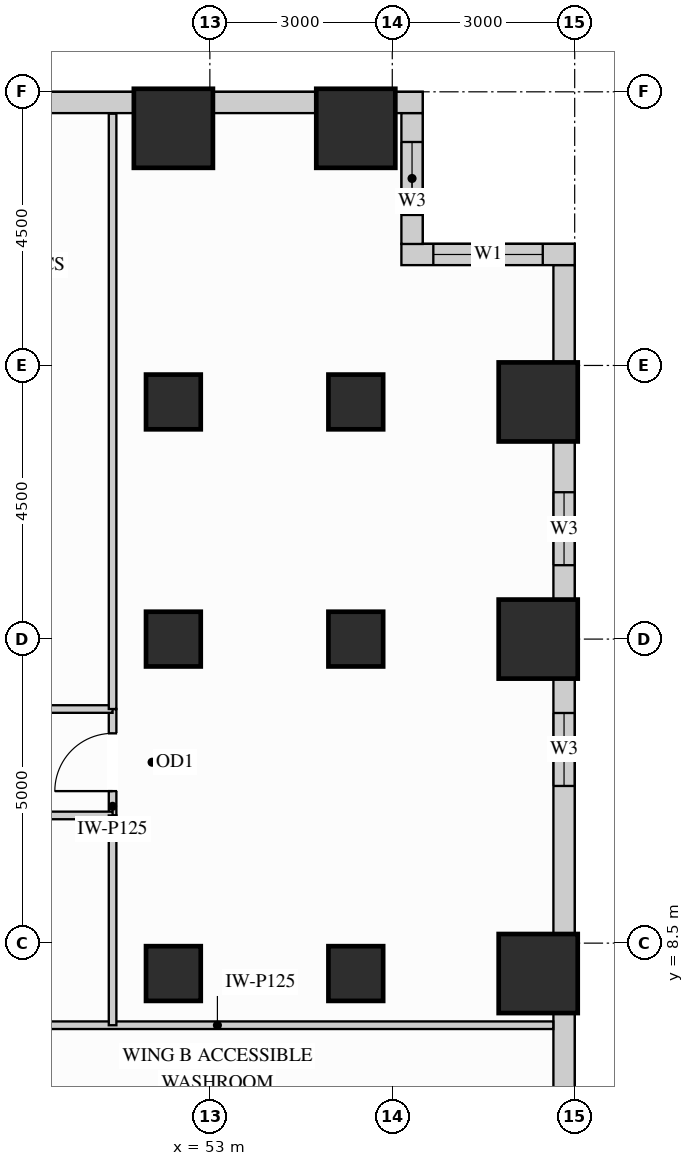
"""IFC4 building model, lengths in metres.
Left out: names, types, materials, properties, quantities, classifications, styles, units other than length and angle.
Written with IfcOpenShell. Run it as: python <this file> out.ifc"""

import sys

from ifc_helpers import new_model, si_unit, direction, frame, frame_2d, origin, origin_2d, place, context, subcontext, project, spatial, rectangle, extrude, source, transform, mapped, element, fill, save


model = new_model("IFC4")
c1 = context("Model", 3, precision=1e-05, world=origin(), true_north=direction((0.0, 1.0)))
c2 = subcontext(c1, "Body", "Model", "MODEL_VIEW")
j1 = project(units=[si_unit("LENGTHUNIT", "METRE"), si_unit("PLANEANGLEUNIT", "RADIAN")], contexts=[c1])
p1 = place(None, origin())
s1 = spatial("IfcSite", under=j1, at=p1, CompositionType="ELEMENT")
p2 = place(p1, origin())
s2 = spatial("IfcBuilding", under=s1, at=p2, CompositionType="ELEMENT")
p3 = place(p2, frame((0.0, 0.0, 62.1)))
s3 = spatial("IfcBuildingStorey", under=s2, at=p3, CompositionType="ELEMENT", Elevation=62.1)
m1 = source(origin(), c2, "Body", "SweptSolid", [
    extrude(rectangle(XDim=0.9, YDim=0.9, at=origin_2d()), origin(), (0.0, 0.0, 1.0), 3.38),
])
for number, where, z_axis, x_axis in (
    (1, (52.4, 13.5, 0.0), (0.0, 0.0, 1.0), (1.0, 0.0, 0.0)),
    (2, (52.4, 17.4, 0.0), (0.0, 0.0, 1.0), (1.0, 0.0, 0.0)),
    (3, (52.4, 8.0, 0.0), (0.0, 0.0, 1.0), (1.0, 0.0, 0.0)),
    (4, (55.4, 13.5, 0.0), (0.0, 0.0, 1.0), (1.0, 0.0, 0.0)),
    (5, (55.4, 17.4, 0.0), (0.0, 0.0, 1.0), (1.0, 0.0, 0.0)),
    (6, (55.4, 8.0, 0.0), (0.0, 0.0, 1.0), (1.0, 0.0, 0.0)),
):
    element("IfcColumn", number, at=place(p3, frame(where, z_axis=z_axis, x_axis=x_axis)), inside=s3, PredefinedType="COLUMN", context=c2, shape_type="MappedRepresentation", body=[
        mapped(m1, transform((0.0, 0.0, 0.0), x_axis=(1.0, 0.0, 0.0), y_axis=(0.0, 1.0, 0.0), z_axis=(0.0, 0.0, 1.0))),
    ])
m2 = source(origin(), c2, "Body", "SweptSolid", [
    extrude(rectangle(XDim=1.3, YDim=1.3, at=origin_2d()), origin(), (0.0, 0.0, 1.0), 3.38),
])
for number, where, z_axis, x_axis in (
    (7, (52.4, 21.9, 0.0), (0.0, 0.0, 1.0), (1.0, 0.0, 0.0)),
    (8, (55.4, 21.9, 0.0), (0.0, 0.0, 1.0), (1.0, 0.0, 0.0)),
    (9, (58.4, 13.5, 0.0), (0.0, 0.0, 1.0), (1.0, 0.0, 0.0)),
    (10, (58.4, 17.4, 0.0), (0.0, 0.0, 1.0), (1.0, 0.0, 0.0)),
    (11, (58.4, 8.0, 0.0), (0.0, 0.0, 1.0), (1.0, 0.0, 0.0)),
):
    element("IfcColumn", number, at=place(p3, frame(where, z_axis=z_axis, x_axis=x_axis)), inside=s3, PredefinedType="COLUMN", context=c2, shape_type="MappedRepresentation", body=[
        mapped(m2, transform((0.0, 0.0, 0.0), x_axis=(1.0, 0.0, 0.0), y_axis=(0.0, 1.0, 0.0), z_axis=(0.0, 0.0, 1.0))),
    ])
m3 = source(origin(), c2, "Body", "SweptSolid", [
    extrude(rectangle(XDim=3.204, YDim=0.35, at=frame_2d((1.602, 0.0))), origin(), (0.0, 0.0, 1.0), 2.51),
])
p4 = place(p3, frame((58.825, 4.148, 0.0), z_axis=(0.0, 0.0, 1.0), x_axis=(0.0, 1.0, 0.0)))
e12 = element("IfcWall", 12, at=p4, inside=s3, PredefinedType="SOLIDWALL", context=c2, shape_type="MappedRepresentation", body=[
    mapped(m3, transform((0.0, 0.0, 0.0), x_axis=(1.0, 0.0, 0.0), y_axis=(0.0, 1.0, 0.0), z_axis=(0.0, 0.0, 1.0))),
])
p5 = place(p3, frame((58.825, 8.648, 0.0), z_axis=(0.0, 0.0, 1.0), x_axis=(0.0, 1.0, 0.0)))
e13 = element("IfcWall", 13, at=p5, inside=s3, PredefinedType="SOLIDWALL", context=c2, shape_type="SweptSolid", body=[
    extrude(rectangle(XDim=4.204, YDim=0.35, at=frame_2d((2.102, 0.0))), origin(), (0.0, 0.0, 1.0), 2.51),
])
p6 = place(p5, frame((2.437, 0.0, 0.78)))
e14 = element("IfcOpeningElement", 14, at=p6, cuts=e13, PredefinedType="OPENING", context=c2, shape_type="SweptSolid", body=[
    extrude(rectangle(XDim=1.2, YDim=1.55, at=frame_2d((0.6, 0.775))), frame((0.0, 0.185, 0.0), z_axis=(0.0, -1.0, 0.0), x_axis=(1.0, 0.0, 0.0)), (0.0, 0.0, 1.0), 0.37),
])
p7 = place(p3, frame((58.825, 14.148, 0.0), z_axis=(0.0, 0.0, 1.0), x_axis=(0.0, 1.0, 0.0)))
e15 = element("IfcWall", 15, at=p7, inside=s3, PredefinedType="SOLIDWALL", context=c2, shape_type="SweptSolid", body=[
    extrude(rectangle(XDim=2.604, YDim=0.35, at=frame_2d((1.302, 0.0))), origin(), (0.0, 0.0, 1.0), 2.51),
])
p8 = place(p7, frame((0.567, 0.0, 0.78)))
e16 = element("IfcOpeningElement", 16, at=p8, cuts=e15, PredefinedType="OPENING", context=c2, shape_type="SweptSolid", body=[
    extrude(rectangle(XDim=1.2, YDim=1.55, at=frame_2d((0.6, 0.775))), frame((0.0, 0.185, 0.0), z_axis=(0.0, -1.0, 0.0), x_axis=(1.0, 0.0, 0.0)), (0.0, 0.0, 1.0), 0.37),
])
m4 = source(origin(), c2, "Body", "SweptSolid", [
    extrude(rectangle(XDim=1.604, YDim=0.35, at=frame_2d((0.802, 0.0))), origin(), (0.0, 0.0, 1.0), 3.365),
])
p9 = place(p3, frame((58.825, 18.048, 0.0), z_axis=(0.0, 0.0, 1.0), x_axis=(0.0, 1.0, 0.0)))
e17 = element("IfcWall", 17, at=p9, inside=s3, PredefinedType="SOLIDWALL", context=c2, shape_type="MappedRepresentation", body=[
    mapped(m4, transform((0.0, 0.0, 0.0), x_axis=(1.0, 0.0, 0.0), y_axis=(0.0, 1.0, 0.0), z_axis=(0.0, 0.0, 1.0))),
])
p10 = place(p3, frame((59.0, 19.825, 0.0), z_axis=(0.0, 0.0, 1.0), x_axis=(-1.0, 0.0, 0.0)))
e18 = element("IfcWall", 18, at=p10, inside=s3, PredefinedType="SOLIDWALL", context=c2, shape_type="SweptSolid", body=[
    extrude(rectangle(XDim=2.85, YDim=0.35, at=frame_2d((1.425, 0.0))), origin(), (0.0, 0.0, 1.0), 3.365),
])
p11 = place(p10, frame((0.525, 0.0, 0.78)))
e19 = element("IfcOpeningElement", 19, at=p11, cuts=e18, PredefinedType="OPENING", context=c2, shape_type="SweptSolid", body=[
    extrude(rectangle(XDim=1.8, YDim=2.1, at=frame_2d((0.9, 1.05))), frame((0.0, 0.185, 0.0), z_axis=(0.0, -1.0, 0.0), x_axis=(1.0, 0.0, 0.0)), (0.0, 0.0, 1.0), 0.37),
])
p12 = place(p3, frame((56.325, 19.998, 0.0), z_axis=(0.0, 0.0, 1.0), x_axis=(0.0, 1.0, 0.0)))
e20 = element("IfcWall", 20, at=p12, inside=s3, PredefinedType="SOLIDWALL", context=c2, shape_type="SweptSolid", body=[
    extrude(rectangle(XDim=2.154, YDim=0.35, at=frame_2d((1.077, 0.0))), origin(), (0.0, 0.0, 1.0), 3.365),
])
p13 = place(p12, frame((0.477, 0.0, 0.78)))
e21 = element("IfcOpeningElement", 21, at=p13, cuts=e20, PredefinedType="OPENING", context=c2, shape_type="SweptSolid", body=[
    extrude(rectangle(XDim=1.2, YDim=2.1, at=frame_2d((0.6, 1.05))), frame((0.0, 0.185, 0.0), z_axis=(0.0, -1.0, 0.0), x_axis=(1.0, 0.0, 0.0)), (0.0, 0.0, 1.0), 0.37),
])
m5 = source(origin(), c2, "Body", "SweptSolid", [
    extrude(rectangle(XDim=0.452, YDim=0.35, at=frame_2d((0.226, 0.0))), origin(), (0.0, 0.0, 1.0), 3.365),
])
p14 = place(p3, frame((56.5, 22.325, 0.0), z_axis=(0.0, 0.0, 1.0), x_axis=(-1.0, 0.0, 0.0)))
e22 = element("IfcWall", 22, at=p14, inside=s3, PredefinedType="SOLIDWALL", context=c2, shape_type="MappedRepresentation", body=[
    mapped(m5, transform((0.0, 0.0, 0.0), x_axis=(1.0, 0.0, 0.0), y_axis=(0.0, 1.0, 0.0), z_axis=(0.0, 0.0, 1.0))),
])
m6 = source(origin(), c2, "Body", "SweptSolid", [
    extrude(rectangle(XDim=1.704, YDim=0.35, at=frame_2d((0.852, 0.0))), origin(), (0.0, 0.0, 1.0), 2.51),
])
for number, where, z_axis, x_axis in (
    (23, (54.752, 22.325, 0.0), (0.0, 0.0, 1.0), (-1.0, 0.0, 0.0)),
    (24, (51.752, 22.325, 0.0), (0.0, 0.0, 1.0), (-1.0, 0.0, 0.0)),
):
    element("IfcWall", number, at=place(p3, frame(where, z_axis=z_axis, x_axis=x_axis)), inside=s3, PredefinedType="SOLIDWALL", context=c2, shape_type="MappedRepresentation", body=[
        mapped(m6, transform((0.0, 0.0, 0.0), x_axis=(1.0, 0.0, 0.0), y_axis=(0.0, 1.0, 0.0), z_axis=(0.0, 0.0, 1.0))),
    ])
p15 = place(p3, frame((51.4, 10.6, 0.0), z_axis=(0.0, 0.0, 1.0), x_axis=(0.0, 1.0, 0.0)))
e25 = element("IfcWall", 25, at=p15, inside=s3, PredefinedType="PARTITIONING", context=c2, shape_type="SweptSolid", body=[
    extrude(rectangle(XDim=1.75, YDim=0.125, at=frame_2d((0.875, 0.0))), origin(), (0.0, 0.0, 1.0), 3.365),
])
p16 = place(p15, frame((0.4, 0.0, 0.0)))
e26 = element("IfcOpeningElement", 26, at=p16, cuts=e25, PredefinedType="OPENING", context=c2, shape_type="SweptSolid", body=[
    extrude(rectangle(XDim=0.95, YDim=2.15, at=frame_2d((0.475, 1.075))), frame((0.0, 0.073, 0.0), z_axis=(0.0, -1.0, 0.0), x_axis=(1.0, 0.0, 0.0)), (0.0, 0.0, 1.0), 0.145),
])
m7 = source(origin(), c2, "Body", "SweptSolid", [
    extrude(rectangle(XDim=11.048, YDim=0.125, at=frame_2d((5.524, 0.0))), origin(), (0.0, 0.0, 1.0), 3.365),
])
p17 = place(p3, frame((47.6, 7.15, 0.0), z_axis=(0.0, 0.0, 1.0), x_axis=(1.0, 0.0, 0.0)))
e27 = element("IfcWall", 27, at=p17, inside=s3, PredefinedType="PARTITIONING", context=c2, shape_type="MappedRepresentation", body=[
    mapped(m7, transform((0.0, 0.0, 0.0), x_axis=(1.0, 0.0, 0.0), y_axis=(0.0, 1.0, 0.0), z_axis=(0.0, 0.0, 1.0))),
])
m8 = source(origin(), c2, "Body", "SweptSolid", [
    extrude(rectangle(XDim=3.8, YDim=0.125, at=frame_2d((1.9, 0.0))), origin(), (0.0, 0.0, 1.0), 3.365),
])
p18 = place(p3, frame((47.6, 12.35, 0.0), z_axis=(0.0, 0.0, 1.0), x_axis=(1.0, 0.0, 0.0)))
e28 = element("IfcWall", 28, at=p18, inside=s3, PredefinedType="PARTITIONING", context=c2, shape_type="MappedRepresentation", body=[
    mapped(m8, transform((0.0, 0.0, 0.0), x_axis=(1.0, 0.0, 0.0), y_axis=(0.0, 1.0, 0.0), z_axis=(0.0, 0.0, 1.0))),
])
p19 = place(p3, frame((47.6, 10.6, 0.0), z_axis=(0.0, 0.0, 1.0), x_axis=(1.0, 0.0, 0.0)))
e29 = element("IfcWall", 29, at=p19, inside=s3, PredefinedType="PARTITIONING", context=c2, shape_type="SweptSolid", body=[
    extrude(rectangle(XDim=3.8, YDim=0.125, at=frame_2d((1.9, 0.0))), origin(), (0.0, 0.0, 1.0), 2.67),
])
p20 = place(p19, frame((1.425, 0.0, 0.0)))
e30 = element("IfcOpeningElement", 30, at=p20, cuts=e29, PredefinedType="OPENING", context=c2, shape_type="SweptSolid", body=[
    extrude(rectangle(XDim=0.95, YDim=2.15, at=frame_2d((0.475, 1.075))), frame((0.0, 0.073, 0.0), z_axis=(0.0, -1.0, 0.0), x_axis=(1.0, 0.0, 0.0)), (0.0, 0.0, 1.0), 0.145),
])
m9 = source(origin(), c2, "Body", "SweptSolid", [
    extrude(rectangle(XDim=3.45, YDim=0.125, at=frame_2d((1.725, 0.0))), origin(), (0.0, 0.0, 1.0), 3.365),
])
p21 = place(p3, frame((51.4, 7.15, 0.0), z_axis=(0.0, 0.0, 1.0), x_axis=(0.0, 1.0, 0.0)))
e31 = element("IfcWall", 31, at=p21, inside=s3, PredefinedType="PARTITIONING", context=c2, shape_type="MappedRepresentation", body=[
    mapped(m9, transform((0.0, 0.0, 0.0), x_axis=(1.0, 0.0, 0.0), y_axis=(0.0, 1.0, 0.0), z_axis=(0.0, 0.0, 1.0))),
])
m10 = source(origin(), c2, "Body", "SweptSolid", [
    extrude(rectangle(XDim=9.79, YDim=0.125, at=frame_2d((4.895, 0.0))), origin(), (0.0, 0.0, 1.0), 3.365),
])
p22 = place(p3, frame((51.4, 12.35, 0.0), z_axis=(0.0, 0.0, 1.0), x_axis=(0.0, 1.0, 0.0)))
e32 = element("IfcWall", 32, at=p22, inside=s3, PredefinedType="PARTITIONING", context=c2, shape_type="MappedRepresentation", body=[
    mapped(m10, transform((0.0, 0.0, 0.0), x_axis=(1.0, 0.0, 0.0), y_axis=(0.0, 1.0, 0.0), z_axis=(0.0, 0.0, 1.0))),
])
m11 = source(origin(), c2, "Body", "SweptSolid", [
    extrude(rectangle(XDim=0.95, YDim=2.15, at=frame_2d((0.475, 1.075))), frame((0.0, 0.025, 0.0), z_axis=(0.0, -1.0, 0.0), x_axis=(1.0, 0.0, 0.0)), (0.0, 0.0, 1.0), 0.05),
])
p23 = place(p16, origin())
e33 = element("IfcDoor", 33, at=p23, inside=s3, OperationType="SINGLE_SWING_LEFT", PredefinedType="DOOR", context=c2, shape_type="MappedRepresentation", body=[
    mapped(m11, transform((0.0, 0.0, 0.0), x_axis=(1.0, 0.0, 0.0), y_axis=(0.0, 1.0, 0.0), z_axis=(0.0, 0.0, 1.0))),
])
fill(e26, e33)
m12 = source(origin(), c2, "Body", "SweptSolid", [
    extrude(rectangle(XDim=1.8, YDim=2.1, at=frame_2d((0.9, 1.05))), frame((0.0, 0.03, 0.0), z_axis=(0.0, -1.0, 0.0), x_axis=(1.0, 0.0, 0.0)), (0.0, 0.0, 1.0), 0.06),
])
p24 = place(p11, origin())
e34 = element("IfcWindow", 34, at=p24, inside=s3, PartitioningType="SINGLE_PANEL", PredefinedType="WINDOW", context=c2, shape_type="MappedRepresentation", body=[
    mapped(m12, transform((0.0, 0.0, 0.0), x_axis=(1.0, 0.0, 0.0), y_axis=(0.0, 1.0, 0.0), z_axis=(0.0, 0.0, 1.0))),
])
fill(e19, e34)
m13 = source(origin(), c2, "Body", "SweptSolid", [
    extrude(rectangle(XDim=1.2, YDim=1.55, at=frame_2d((0.6, 0.775))), frame((0.0, 0.03, 0.0), z_axis=(0.0, -1.0, 0.0), x_axis=(1.0, 0.0, 0.0)), (0.0, 0.0, 1.0), 0.06),
])
p25 = place(p6, origin())
e35 = element("IfcWindow", 35, at=p25, inside=s3, PartitioningType="SINGLE_PANEL", PredefinedType="WINDOW", context=c2, shape_type="MappedRepresentation", body=[
    mapped(m13, transform((0.0, 0.0, 0.0), x_axis=(1.0, 0.0, 0.0), y_axis=(0.0, 1.0, 0.0), z_axis=(0.0, 0.0, 1.0))),
])
fill(e14, e35)
p26 = place(p8, origin())
e36 = element("IfcWindow", 36, at=p26, inside=s3, PartitioningType="SINGLE_PANEL", PredefinedType="WINDOW", context=c2, shape_type="MappedRepresentation", body=[
    mapped(m13, transform((0.0, 0.0, 0.0), x_axis=(1.0, 0.0, 0.0), y_axis=(0.0, 1.0, 0.0), z_axis=(0.0, 0.0, 1.0))),
])
fill(e16, e36)
m14 = source(origin(), c2, "Body", "SweptSolid", [
    extrude(rectangle(XDim=1.2, YDim=2.1, at=frame_2d((0.6, 1.05))), frame((0.0, 0.03, 0.0), z_axis=(0.0, -1.0, 0.0), x_axis=(1.0, 0.0, 0.0)), (0.0, 0.0, 1.0), 0.06),
])
p27 = place(p13, origin())
e37 = element("IfcWindow", 37, at=p27, inside=s3, PartitioningType="SINGLE_PANEL", PredefinedType="WINDOW", context=c2, shape_type="MappedRepresentation", body=[
    mapped(m14, transform((0.0, 0.0, 0.0), x_axis=(1.0, 0.0, 0.0), y_axis=(0.0, 1.0, 0.0), z_axis=(0.0, 0.0, 1.0))),
])
fill(e21, e37)
save(model, sys.argv[1])
